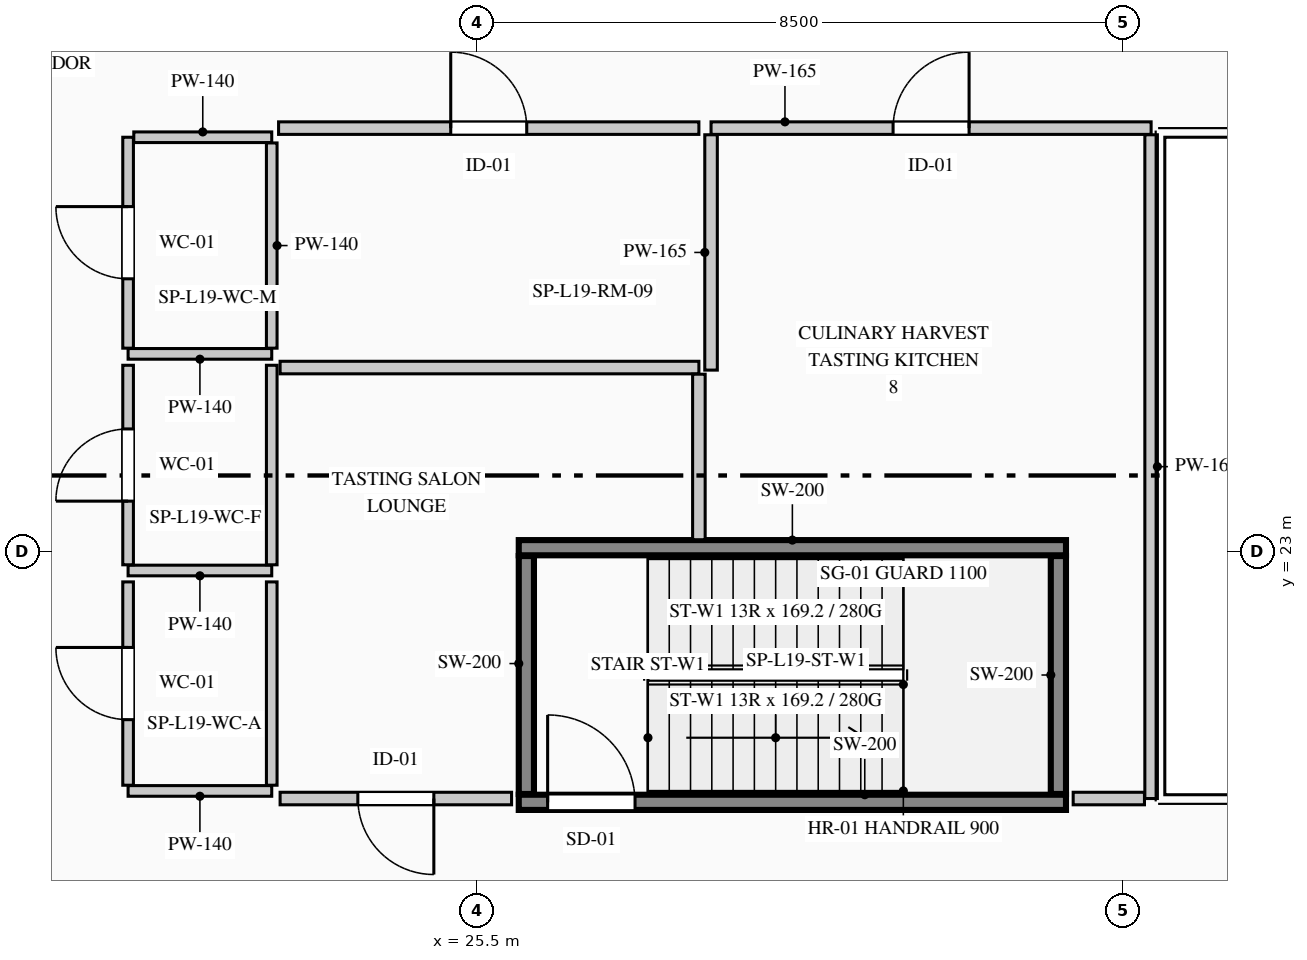
"""IFC4 building model, lengths in metres.
Left out: names, types, materials, properties, quantities, classifications, styles, units other than length and angle.
Written with IfcOpenShell. Run it as: python <this file> out.ifc"""

import sys

from ifc_helpers import new_model, si_unit, direction, frame, frame_2d, origin, place, context, subcontext, project, spatial, rectangle, extrude, element, fill, save


model = new_model("IFC4")
c1 = context("Model", 3, precision=1e-05, world=origin(), true_north=direction((0.0, 1.0)))
c2 = subcontext(c1, "Body", "Model", "MODEL_VIEW")
j1 = project(units=[si_unit("LENGTHUNIT", "METRE"), si_unit("PLANEANGLEUNIT", "RADIAN")], contexts=[c1])
p1 = place(None, origin())
s1 = spatial("IfcSite", under=j1, at=p1, CompositionType="ELEMENT")
p2 = place(p1, origin())
s2 = spatial("IfcBuilding", under=s1, at=p2, CompositionType="ELEMENT")
p3 = place(p2, frame((0.0, 0.0, 84.2)))
s3 = spatial("IfcBuildingStorey", under=s2, at=p3, CompositionType="ELEMENT", Elevation=84.2)
p4 = place(p3, frame((26.05, 19.7, 0.0), z_axis=(0.0, 0.0, 1.0), x_axis=(1.0, 0.0, 0.0)))
e1 = element("IfcWall", 1, at=p4, inside=s3, PredefinedType="SHEAR", context=c2, shape_type="SweptSolid", body=[
    extrude(rectangle(XDim=7.2, YDim=0.2, at=frame_2d((3.6, 0.0))), origin(), (0.0, 0.0, 1.0), 4.4),
])
p5 = place(p4, frame((0.38, 0.0, 0.0)))
e2 = element("IfcOpeningElement", 2, at=p5, cuts=e1, PredefinedType="OPENING", context=c2, shape_type="SweptSolid", body=[
    extrude(rectangle(XDim=1.15, YDim=2.2, at=frame_2d((0.575, 1.1))), frame((0.0, 0.11, 0.0), z_axis=(0.0, -1.0, 0.0), x_axis=(1.0, 0.0, 0.0)), (0.0, 0.0, 1.0), 0.22),
])
p6 = place(p3, frame((26.05, 23.05, 0.0), z_axis=(0.0, 0.0, 1.0), x_axis=(1.0, 0.0, 0.0)))
e3 = element("IfcWall", 3, at=p6, inside=s3, PredefinedType="SHEAR", context=c2, shape_type="SweptSolid", body=[
    extrude(rectangle(XDim=7.2, YDim=0.2, at=frame_2d((3.6, 0.0))), origin(), (0.0, 0.0, 1.0), 4.4),
])
for number, where, z_axis, x_axis in (
    (4, (26.15, 19.81, 0.0), (0.0, 0.0, 1.0), (0.0, 1.0, 0.0)),
    (5, (33.15, 19.81, 0.0), (0.0, 0.0, 1.0), (0.0, 1.0, 0.0)),
):
    element("IfcWall", number, at=place(p3, frame(where, z_axis=z_axis, x_axis=x_axis)), inside=s3, PredefinedType="SHEAR", context=c2, shape_type="SweptSolid", body=[
        extrude(rectangle(XDim=3.13, YDim=0.2, at=frame_2d((1.565, 0.0))), origin(), (0.0, 0.0, 1.0), 4.4),
    ])
p7 = place(p3, frame((22.8, 25.6, 0.0), z_axis=(0.0, 0.0, 1.0), x_axis=(-1.0, 0.0, 0.0)))
e6 = element("IfcWall", 6, at=p7, inside=s3, PredefinedType="PARTITIONING", context=c2, shape_type="SweptSolid", body=[
    extrude(rectangle(XDim=1.89, YDim=0.14, at=frame_2d((0.945, 0.0))), origin(), (0.0, 0.0, 1.0), 4.115),
])
p8 = place(p3, frame((20.91, 25.675, 0.0), z_axis=(0.0, 0.0, 1.0), x_axis=(0.0, 1.0, 0.0)))
e7 = element("IfcWall", 7, at=p8, inside=s3, PredefinedType="PARTITIONING", context=c2, shape_type="SweptSolid", body=[
    extrude(rectangle(XDim=2.775, YDim=0.14, at=frame_2d((1.387, 0.0))), origin(), (0.0, 0.0, 1.0), 4.115),
])
p9 = place(p8, frame((0.913, 0.0, 0.0)))
e8 = element("IfcOpeningElement", 8, at=p9, cuts=e7, PredefinedType="OPENING", context=c2, shape_type="SweptSolid", body=[
    extrude(rectangle(XDim=0.95, YDim=2.15, at=frame_2d((0.475, 1.075))), frame((0.0, 0.08, 0.0), z_axis=(0.0, -1.0, 0.0), x_axis=(1.0, 0.0, 0.0)), (0.0, 0.0, 1.0), 0.16),
])
p10 = place(p3, frame((20.985, 28.45, 0.0), z_axis=(0.0, 0.0, 1.0), x_axis=(1.0, 0.0, 0.0)))
e9 = element("IfcWall", 9, at=p10, inside=s3, PredefinedType="PARTITIONING", context=c2, shape_type="SweptSolid", body=[
    extrude(rectangle(XDim=1.815, YDim=0.14, at=frame_2d((0.907, 0.0))), origin(), (0.0, 0.0, 1.0), 4.115),
])
p11 = place(p3, frame((22.8, 28.375, 0.0), z_axis=(0.0, 0.0, 1.0), x_axis=(0.0, -1.0, 0.0)))
e10 = element("IfcWall", 10, at=p11, inside=s3, PredefinedType="PARTITIONING", context=c2, shape_type="SweptSolid", body=[
    extrude(rectangle(XDim=2.7, YDim=0.14, at=frame_2d((1.35, 0.0))), origin(), (0.0, 0.0, 1.0), 3.8),
])
p12 = place(p3, frame((22.8, 22.75, 0.0), z_axis=(0.0, 0.0, 1.0), x_axis=(-1.0, 0.0, 0.0)))
e11 = element("IfcWall", 11, at=p12, inside=s3, PredefinedType="PARTITIONING", context=c2, shape_type="SweptSolid", body=[
    extrude(rectangle(XDim=1.89, YDim=0.14, at=frame_2d((0.945, 0.0))), origin(), (0.0, 0.0, 1.0), 4.115),
])
p13 = place(p3, frame((20.91, 22.825, 0.0), z_axis=(0.0, 0.0, 1.0), x_axis=(0.0, 1.0, 0.0)))
e12 = element("IfcWall", 12, at=p13, inside=s3, PredefinedType="PARTITIONING", context=c2, shape_type="SweptSolid", body=[
    extrude(rectangle(XDim=2.625, YDim=0.14, at=frame_2d((1.312, 0.0))), origin(), (0.0, 0.0, 1.0), 4.115),
])
p14 = place(p13, frame((0.837, 0.0, 0.0)))
e13 = element("IfcOpeningElement", 13, at=p14, cuts=e12, PredefinedType="OPENING", context=c2, shape_type="SweptSolid", body=[
    extrude(rectangle(XDim=0.95, YDim=2.15, at=frame_2d((0.475, 1.075))), frame((0.0, 0.08, 0.0), z_axis=(0.0, -1.0, 0.0), x_axis=(1.0, 0.0, 0.0)), (0.0, 0.0, 1.0), 0.16),
])
p15 = place(p3, frame((22.8, 25.45, 0.0), z_axis=(0.0, 0.0, 1.0), x_axis=(0.0, -1.0, 0.0)))
e14 = element("IfcWall", 14, at=p15, inside=s3, PredefinedType="PARTITIONING", context=c2, shape_type="SweptSolid", body=[
    extrude(rectangle(XDim=2.625, YDim=0.14, at=frame_2d((1.312, 0.0))), origin(), (0.0, 0.0, 1.0), 3.8),
])
p16 = place(p3, frame((22.8, 19.85, 0.0), z_axis=(0.0, 0.0, 1.0), x_axis=(-1.0, 0.0, 0.0)))
e15 = element("IfcWall", 15, at=p16, inside=s3, PredefinedType="PARTITIONING", context=c2, shape_type="SweptSolid", body=[
    extrude(rectangle(XDim=1.89, YDim=0.14, at=frame_2d((0.945, 0.0))), origin(), (0.0, 0.0, 1.0), 4.115),
])
p17 = place(p3, frame((20.91, 19.925, 0.0), z_axis=(0.0, 0.0, 1.0), x_axis=(0.0, 1.0, 0.0)))
e16 = element("IfcWall", 16, at=p17, inside=s3, PredefinedType="PARTITIONING", context=c2, shape_type="SweptSolid", body=[
    extrude(rectangle(XDim=2.675, YDim=0.14, at=frame_2d((1.337, 0.0))), origin(), (0.0, 0.0, 1.0), 4.115),
])
p18 = place(p17, frame((0.863, 0.0, 0.0)))
e17 = element("IfcOpeningElement", 17, at=p18, cuts=e16, PredefinedType="OPENING", context=c2, shape_type="SweptSolid", body=[
    extrude(rectangle(XDim=0.95, YDim=2.15, at=frame_2d((0.475, 1.075))), frame((0.0, 0.08, 0.0), z_axis=(0.0, -1.0, 0.0), x_axis=(1.0, 0.0, 0.0)), (0.0, 0.0, 1.0), 0.16),
])
p19 = place(p3, frame((22.8, 22.6, 0.0), z_axis=(0.0, 0.0, 1.0), x_axis=(0.0, -1.0, 0.0)))
e18 = element("IfcWall", 18, at=p19, inside=s3, PredefinedType="PARTITIONING", context=c2, shape_type="SweptSolid", body=[
    extrude(rectangle(XDim=2.675, YDim=0.14, at=frame_2d((1.337, 0.0))), origin(), (0.0, 0.0, 1.0), 3.8),
])
p20 = place(p3, frame((25.956, 19.75, 0.0), z_axis=(0.0, 0.0, 1.0), x_axis=(-1.0, 0.0, 0.0)))
e19 = element("IfcWall", 19, at=p20, inside=s3, PredefinedType="PARTITIONING", context=c2, shape_type="SweptSolid", body=[
    extrude(rectangle(XDim=3.046, YDim=0.165, at=frame_2d((1.523, 0.0))), origin(), (0.0, 0.0, 1.0), 4.115),
])
p21 = place(p20, frame((1.023, 0.0, 0.0)))
e20 = element("IfcOpeningElement", 20, at=p21, cuts=e19, PredefinedType="OPENING", context=c2, shape_type="SweptSolid", body=[
    extrude(rectangle(XDim=1.0, YDim=2.15, at=frame_2d((0.5, 1.075))), frame((0.0, 0.093, 0.0), z_axis=(0.0, -1.0, 0.0), x_axis=(1.0, 0.0, 0.0)), (0.0, 0.0, 1.0), 0.185),
])
p22 = place(p3, frame((22.91, 25.42, 0.0), z_axis=(0.0, 0.0, 1.0), x_axis=(1.0, 0.0, 0.0)))
e21 = element("IfcWall", 21, at=p22, inside=s3, PredefinedType="PARTITIONING", context=c2, shape_type="SweptSolid", body=[
    extrude(rectangle(XDim=5.51, YDim=0.165, at=frame_2d((2.755, 0.0))), origin(), (0.0, 0.0, 1.0), 3.8),
])
p23 = place(p3, frame((28.42, 25.333, 0.0), z_axis=(0.0, 0.0, 1.0), x_axis=(0.0, -1.0, 0.0)))
e22 = element("IfcWall", 22, at=p23, inside=s3, PredefinedType="PARTITIONING", context=c2, shape_type="SweptSolid", body=[
    extrude(rectangle(XDim=2.177, YDim=0.165, at=frame_2d((1.089, 0.0))), origin(), (0.0, 0.0, 1.0), 4.115),
])
p24 = place(p3, frame((28.58, 28.57, 0.0), z_axis=(0.0, 0.0, 1.0), x_axis=(1.0, 0.0, 0.0)))
e23 = element("IfcWall", 23, at=p24, inside=s3, PredefinedType="PARTITIONING", context=c2, shape_type="SweptSolid", body=[
    extrude(rectangle(XDim=5.79, YDim=0.165, at=frame_2d((2.895, 0.0))), origin(), (0.0, 0.0, 1.0), 3.8),
])
p25 = place(p24, frame((2.395, 0.0, 0.0)))
e24 = element("IfcOpeningElement", 24, at=p25, cuts=e23, PredefinedType="OPENING", context=c2, shape_type="SweptSolid", body=[
    extrude(rectangle(XDim=1.0, YDim=2.15, at=frame_2d((0.5, 1.075))), frame((0.0, 0.093, 0.0), z_axis=(0.0, -1.0, 0.0), x_axis=(1.0, 0.0, 0.0)), (0.0, 0.0, 1.0), 0.185),
])
p26 = place(p3, frame((34.37, 28.482, 0.0), z_axis=(0.0, 0.0, 1.0), x_axis=(0.0, -1.0, 0.0)))
e25 = element("IfcWall", 25, at=p26, inside=s3, PredefinedType="PARTITIONING", context=c2, shape_type="SweptSolid", body=[
    extrude(rectangle(XDim=8.732, YDim=0.165, at=frame_2d((4.366, 0.0))), origin(), (0.0, 0.0, 1.0), 4.115),
])
p27 = place(p3, frame((34.282, 19.75, 0.0), z_axis=(0.0, 0.0, 1.0), x_axis=(-1.0, 0.0, 0.0)))
e26 = element("IfcWall", 26, at=p27, inside=s3, PredefinedType="PARTITIONING", context=c2, shape_type="SweptSolid", body=[
    extrude(rectangle(XDim=0.938, YDim=0.165, at=frame_2d((0.469, 0.0))), origin(), (0.0, 0.0, 1.0), 4.115),
])
p28 = place(p3, frame((28.58, 25.386, 0.0), z_axis=(0.0, 0.0, 1.0), x_axis=(0.0, 1.0, 0.0)))
e27 = element("IfcWall", 27, at=p28, inside=s3, PredefinedType="PARTITIONING", context=c2, shape_type="SweptSolid", body=[
    extrude(rectangle(XDim=3.096, YDim=0.165, at=frame_2d((1.548, 0.0))), origin(), (0.0, 0.0, 1.0), 4.115),
])
p29 = place(p3, frame((22.89, 28.57, 0.0), z_axis=(0.0, 0.0, 1.0), x_axis=(1.0, 0.0, 0.0)))
e28 = element("IfcWall", 28, at=p29, inside=s3, PredefinedType="PARTITIONING", context=c2, shape_type="SweptSolid", body=[
    extrude(rectangle(XDim=5.53, YDim=0.165, at=frame_2d((2.765, 0.0))), origin(), (0.0, 0.0, 1.0), 3.8),
])
p30 = place(p29, frame((2.265, 0.0, 0.0)))
e29 = element("IfcOpeningElement", 29, at=p30, cuts=e28, PredefinedType="OPENING", context=c2, shape_type="SweptSolid", body=[
    extrude(rectangle(XDim=1.0, YDim=2.15, at=frame_2d((0.5, 1.075))), frame((0.0, 0.093, 0.0), z_axis=(0.0, -1.0, 0.0), x_axis=(1.0, 0.0, 0.0)), (0.0, 0.0, 1.0), 0.185),
])
p31 = place(p5, origin())
e30 = element("IfcDoor", 30, at=p31, inside=s3, OperationType="SINGLE_SWING_LEFT", PredefinedType="DOOR", context=c2, shape_type="SweptSolid", body=[
    extrude(rectangle(XDim=1.15, YDim=2.2, at=frame_2d((0.575, 1.1))), frame((0.0, 0.025, 0.0), z_axis=(0.0, -1.0, 0.0), x_axis=(1.0, 0.0, 0.0)), (0.0, 0.0, 1.0), 0.05),
])
fill(e2, e30)
p32 = place(p9, origin())
e31 = element("IfcDoor", 31, at=p32, inside=s3, OperationType="SINGLE_SWING_RIGHT", PredefinedType="DOOR", context=c2, shape_type="SweptSolid", body=[
    extrude(rectangle(XDim=0.95, YDim=2.15, at=frame_2d((0.475, 1.075))), frame((0.0, 0.025, 0.0), z_axis=(0.0, -1.0, 0.0), x_axis=(1.0, 0.0, 0.0)), (0.0, 0.0, 1.0), 0.05),
])
fill(e8, e31)
p33 = place(p14, origin())
e32 = element("IfcDoor", 32, at=p33, inside=s3, OperationType="SINGLE_SWING_LEFT", PredefinedType="DOOR", context=c2, shape_type="SweptSolid", body=[
    extrude(rectangle(XDim=0.95, YDim=2.15, at=frame_2d((0.475, 1.075))), frame((0.0, 0.025, 0.0), z_axis=(0.0, -1.0, 0.0), x_axis=(1.0, 0.0, 0.0)), (0.0, 0.0, 1.0), 0.05),
])
fill(e13, e32)
p34 = place(p18, origin())
e33 = element("IfcDoor", 33, at=p34, inside=s3, OperationType="SINGLE_SWING_RIGHT", PredefinedType="DOOR", context=c2, shape_type="SweptSolid", body=[
    extrude(rectangle(XDim=0.95, YDim=2.15, at=frame_2d((0.475, 1.075))), frame((0.0, 0.025, 0.0), z_axis=(0.0, -1.0, 0.0), x_axis=(1.0, 0.0, 0.0)), (0.0, 0.0, 1.0), 0.05),
])
fill(e17, e33)
p35 = place(p21, origin())
e34 = element("IfcDoor", 34, at=p35, inside=s3, OperationType="SINGLE_SWING_LEFT", PredefinedType="DOOR", context=c2, shape_type="SweptSolid", body=[
    extrude(rectangle(XDim=1.0, YDim=2.15, at=frame_2d((0.5, 1.075))), frame((0.0, 0.025, 0.0), z_axis=(0.0, -1.0, 0.0), x_axis=(1.0, 0.0, 0.0)), (0.0, 0.0, 1.0), 0.05),
])
fill(e20, e34)
p36 = place(p25, origin())
e35 = element("IfcDoor", 35, at=p36, inside=s3, OperationType="SINGLE_SWING_RIGHT", PredefinedType="DOOR", context=c2, shape_type="SweptSolid", body=[
    extrude(rectangle(XDim=1.0, YDim=2.15, at=frame_2d((0.5, 1.075))), frame((0.0, 0.025, 0.0), z_axis=(0.0, -1.0, 0.0), x_axis=(1.0, 0.0, 0.0)), (0.0, 0.0, 1.0), 0.05),
])
fill(e24, e35)
p37 = place(p30, origin())
e36 = element("IfcDoor", 36, at=p37, inside=s3, OperationType="SINGLE_SWING_LEFT", PredefinedType="DOOR", context=c2, shape_type="SweptSolid", body=[
    extrude(rectangle(XDim=1.0, YDim=2.15, at=frame_2d((0.5, 1.075))), frame((0.0, 0.025, 0.0), z_axis=(0.0, -1.0, 0.0), x_axis=(1.0, 0.0, 0.0)), (0.0, 0.0, 1.0), 0.05),
])
fill(e29, e36)
save(model, sys.argv[1])
